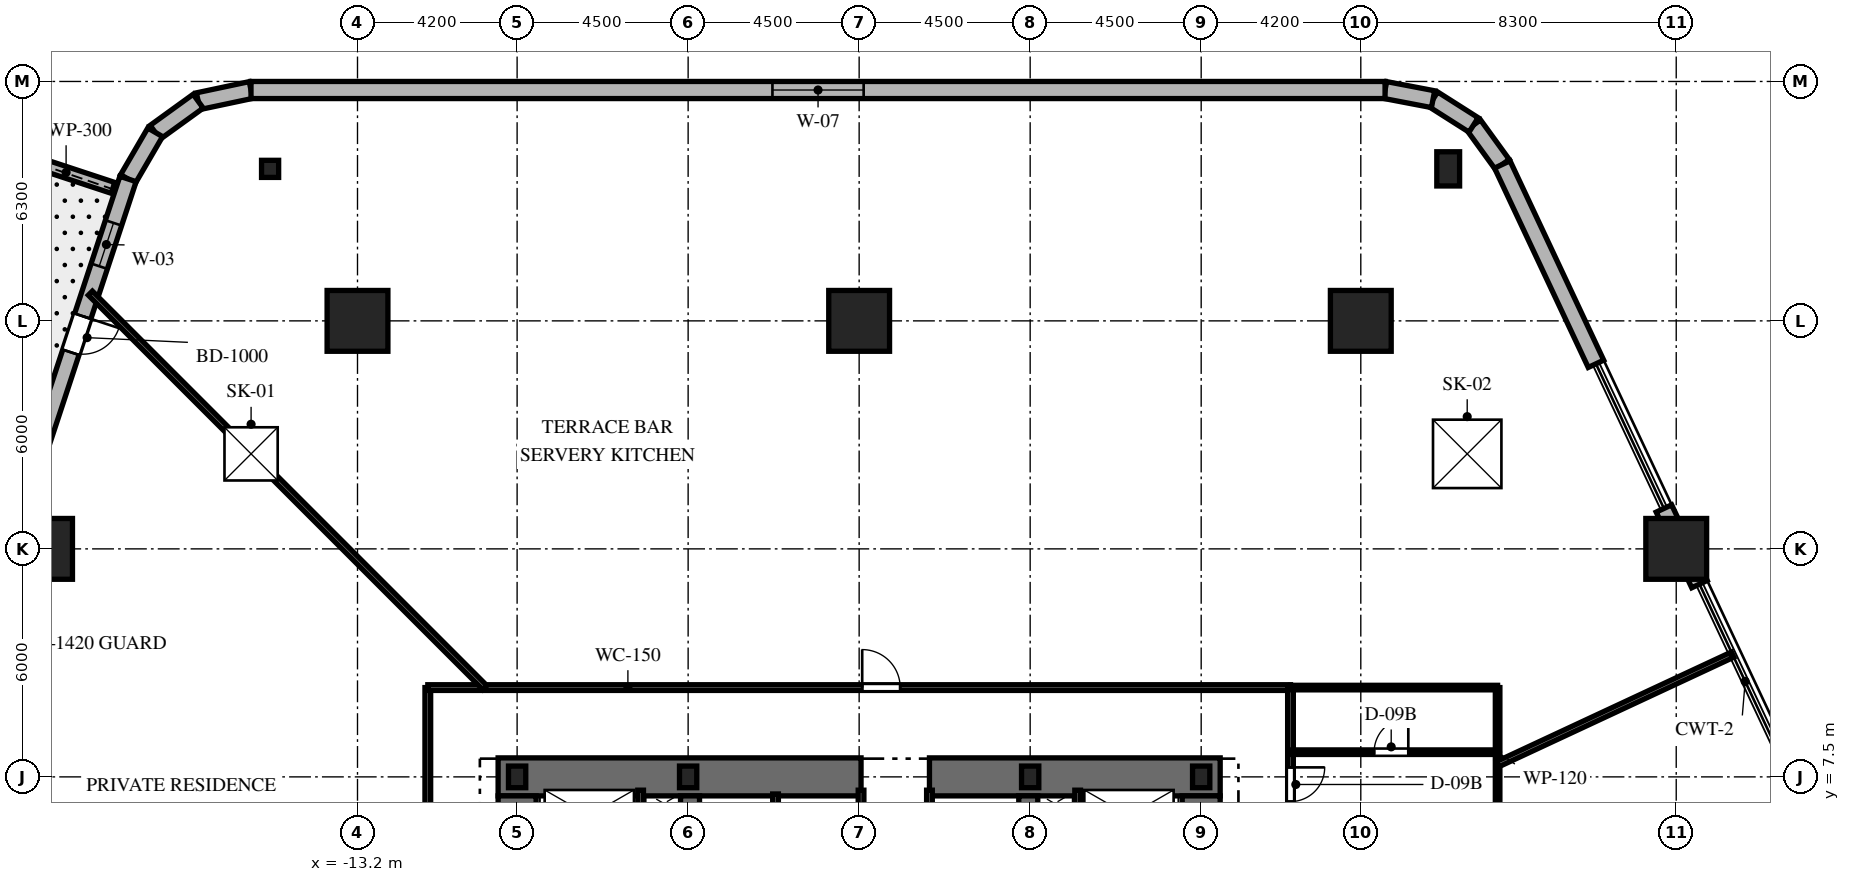
"""IFC4 building model, lengths in metres.
Left out: names, types, materials, properties, quantities, classifications, styles, units other than length and angle.
Written with IfcOpenShell. Run it as: python <this file> out.ifc"""

import sys

from ifc_helpers import new_model, si_unit, direction, frame, frame_2d, origin, origin_2d, place, context, subcontext, project, spatial, rectangle, i_section, extrude, element, fill, save


model = new_model("IFC4")
c1 = context("Model", 3, precision=1e-05, world=origin(), true_north=direction((0.0, 1.0)))
c2 = subcontext(c1, "Body", "Model", "MODEL_VIEW")
j1 = project(units=[si_unit("LENGTHUNIT", "METRE"), si_unit("PLANEANGLEUNIT", "RADIAN")], contexts=[c1])
p1 = place(None, origin())
s1 = spatial("IfcSite", under=j1, at=p1, CompositionType="ELEMENT")
p2 = place(p1, origin())
s2 = spatial("IfcBuilding", under=s1, at=p2, CompositionType="ELEMENT")
p3 = place(p2, frame((0.0, 0.0, 28.2)))
s3 = spatial("IfcBuildingStorey", under=s2, at=p3, CompositionType="ELEMENT", Elevation=28.2)
p4 = place(p3, frame((-9.5, 7.5, 0.0), z_axis=(0.0, 0.0, 1.0), x_axis=(1.0, 0.0, 0.0)))
e1 = element("IfcWall", 1, at=p4, inside=s3, PredefinedType="SHEAR", context=c2, shape_type="SweptSolid", body=[
    extrude(rectangle(XDim=9.55, YDim=1.0, at=frame_2d((4.775, 0.0))), origin(), (0.0, 0.0, 1.0), 6.0),
])
p5 = place(p3, frame((1.85, 7.5, 0.0), z_axis=(0.0, 0.0, 1.0), x_axis=(1.0, 0.0, 0.0)))
e2 = element("IfcWall", 2, at=p5, inside=s3, PredefinedType="SHEAR", context=c2, shape_type="SweptSolid", body=[
    extrude(rectangle(XDim=7.65, YDim=1.0, at=frame_2d((3.825, 0.0))), origin(), (0.0, 0.0, 1.0), 6.0),
])
p6 = place(p3, frame((-9.0, -7.0, 0.0), z_axis=(0.0, 0.0, 1.0), x_axis=(0.0, 1.0, 0.0)))
e3 = element("IfcWall", 3, at=p6, inside=s3, PredefinedType="SHEAR", context=c2, shape_type="SweptSolid", body=[
    extrude(rectangle(XDim=14.0, YDim=1.0, at=frame_2d((7.0, 0.0))), origin(), (0.0, 0.0, 1.0), 6.0),
])
p7 = place(p6, frame((10.125, 0.0, 0.0)))
e4 = element("IfcOpeningElement", 4, at=p7, cuts=e3, PredefinedType="OPENING", context=c2, shape_type="SweptSolid", body=[
    extrude(rectangle(XDim=1.05, YDim=2.15, at=frame_2d((0.525, 1.075))), frame((0.0, 0.51, 0.0), z_axis=(0.0, -1.0, 0.0), x_axis=(1.0, 0.0, 0.0)), (0.0, 0.0, 1.0), 1.02),
])
p8 = place(p3, frame((9.0, -7.0, 0.0), z_axis=(0.0, 0.0, 1.0), x_axis=(0.0, 1.0, 0.0)))
e5 = element("IfcWall", 5, at=p8, inside=s3, PredefinedType="SHEAR", context=c2, shape_type="SweptSolid", body=[
    extrude(rectangle(XDim=14.0, YDim=1.0, at=frame_2d((7.0, 0.0))), origin(), (0.0, 0.0, 1.0), 6.0),
])
p9 = place(p8, frame((10.125, 0.0, 0.0)))
e6 = element("IfcOpeningElement", 6, at=p9, cuts=e5, PredefinedType="OPENING", context=c2, shape_type="SweptSolid", body=[
    extrude(rectangle(XDim=1.05, YDim=2.15, at=frame_2d((0.525, 1.075))), frame((0.0, 0.51, 0.0), z_axis=(0.0, -1.0, 0.0), x_axis=(1.0, 0.0, 0.0)), (0.0, 0.0, 1.0), 1.02),
])
for number, where, z_axis, x_axis in (
    (7, (-4.45, 2.25, 0.0), (0.0, 0.0, 1.0), (0.0, 1.0, 0.0)),
    (8, (4.45, 2.25, 0.0), (0.0, 0.0, 1.0), (0.0, 1.0, 0.0)),
):
    element("IfcWall", number, at=place(p3, frame(where, z_axis=z_axis, x_axis=x_axis)), inside=s3, PredefinedType="SHEAR", context=c2, shape_type="SweptSolid", body=[
        extrude(rectangle(XDim=4.75, YDim=0.5, at=frame_2d((2.375, 0.0))), origin(), (0.0, 0.0, 1.0), 6.0),
    ])
for number, where, z_axis, x_axis in (
    (9, (9.0, 7.5, 0.0), (0.0, 0.0, 1.0), (1.0, 0.0, 0.0)),
    (10, (4.5, 7.5, 0.0), (0.0, 0.0, 1.0), (1.0, 0.0, 0.0)),
    (11, (-4.5, 7.5, 0.0), (0.0, 0.0, 1.0), (1.0, 0.0, 0.0)),
    (12, (-9.0, 7.5, 0.0), (0.0, 0.0, 1.0), (1.0, 0.0, 0.0)),
):
    element("IfcColumn", number, at=place(p3, frame(where, z_axis=z_axis, x_axis=x_axis)), inside=s3, PredefinedType="COLUMN", context=c2, shape_type="SweptSolid", body=[
        extrude(i_section(OverallWidth=0.454, OverallDepth=0.569, WebThickness=0.078, FlangeThickness=0.125, at=origin_2d()), origin(), (0.0, 0.0, 1.0), 6.0),
    ])
for number, where, z_axis, x_axis in (
    (13, (-21.5, 13.5, 0.0), (0.0, 0.0, 1.0), (1.0, 0.0, 0.0)),
    (14, (21.5, 13.5, 0.0), (0.0, 0.0, 1.0), (1.0, 0.0, 0.0)),
    (15, (-13.2, 19.5, 0.0), (0.0, 0.0, 1.0), (1.0, 0.0, 0.0)),
    (16, (0.0, 19.5, 0.0), (0.0, 0.0, 1.0), (1.0, 0.0, 0.0)),
    (17, (13.2, 19.5, 0.0), (0.0, 0.0, 1.0), (1.0, 0.0, 0.0)),
):
    element("IfcColumn", number, at=place(p3, frame(where, z_axis=z_axis, x_axis=x_axis)), inside=s3, PredefinedType="COLUMN", context=c2, shape_type="SweptSolid", body=[
        extrude(rectangle(XDim=1.6, YDim=1.6, at=origin_2d()), origin(), (0.0, 0.0, 1.0), 6.0),
    ])
p10 = place(p3, frame((15.5, 23.5, 0.0), z_axis=(0.0, 0.0, 1.0), x_axis=(1.0, 0.0, 0.0)))
e18 = element("IfcColumn", 18, at=p10, inside=s3, PredefinedType="PILASTER", context=c2, shape_type="SweptSolid", body=[
    extrude(rectangle(XDim=0.6, YDim=0.9, at=origin_2d()), origin(), (0.0, 0.0, 1.0), 6.0),
])
p11 = place(p3, frame((-15.5, 23.5, 0.0), z_axis=(0.0, 0.0, 1.0), x_axis=(1.0, 0.0, 0.0)))
e19 = element("IfcColumn", 19, at=p11, inside=s3, PredefinedType="PILASTER", context=c2, shape_type="SweptSolid", body=[
    extrude(rectangle(XDim=0.45, YDim=0.45, at=origin_2d()), origin(), (0.0, 0.0, 1.0), 6.0),
])
p12 = place(p3, frame((16.924, 23.616, 0.0), z_axis=(0.0, 0.0, 1.0), x_axis=(-0.587471507827, 0.809244850148, 0.0)))
e20 = element("IfcWall", 20, at=p12, inside=s3, PredefinedType="SOLIDWALL", context=c2, shape_type="SweptSolid", body=[
    extrude(rectangle(XDim=1.286, YDim=0.45, at=frame_2d((0.643, 0.0))), origin(), (0.0, 0.0, 1.0), 5.7),
])
p13 = place(p3, frame((16.168, 24.656, 0.0), z_axis=(0.0, 0.0, 1.0), x_axis=(-0.844090705307, 0.536200411426, 0.0)))
e21 = element("IfcWall", 21, at=p13, inside=s3, PredefinedType="SOLIDWALL", context=c2, shape_type="SweptSolid", body=[
    extrude(rectangle(XDim=1.264, YDim=0.45, at=frame_2d((0.632, 0.0))), origin(), (0.0, 0.0, 1.0), 5.7),
])
p14 = place(p3, frame((15.101, 25.334, 0.0), z_axis=(0.0, 0.0, 1.0), x_axis=(-0.982280348181, 0.18741749539, 0.0)))
e22 = element("IfcWall", 22, at=p14, inside=s3, PredefinedType="SOLIDWALL", context=c2, shape_type="SweptSolid", body=[
    extrude(rectangle(XDim=1.286, YDim=0.45, at=frame_2d((0.643, 0.0))), origin(), (0.0, 0.0, 1.0), 5.7),
])
p15 = place(p3, frame((-16.002, 25.575, 0.0), z_axis=(0.0, 0.0, 1.0), x_axis=(-0.978297489829, -0.207205263915, 0.0)))
e23 = element("IfcWall", 23, at=p15, inside=s3, PredefinedType="SOLIDWALL", context=c2, shape_type="SweptSolid", body=[
    extrude(rectangle(XDim=1.421, YDim=0.45, at=frame_2d((0.71, 0.0))), origin(), (0.0, 0.0, 1.0), 5.7),
])
p16 = place(p3, frame((-17.392, 25.281, 0.0), z_axis=(0.0, 0.0, 1.0), x_axis=(-0.810222644551, -0.586122228086, 0.0)))
e24 = element("IfcWall", 24, at=p16, inside=s3, PredefinedType="SOLIDWALL", context=c2, shape_type="SweptSolid", body=[
    extrude(rectangle(XDim=1.397, YDim=0.45, at=frame_2d((0.698, 0.0))), origin(), (0.0, 0.0, 1.0), 5.7),
])
p17 = place(p3, frame((-18.524, 24.462, 0.0), z_axis=(0.0, 0.0, 1.0), x_axis=(-0.503080278093, -0.864239685385, 0.0)))
e25 = element("IfcWall", 25, at=p17, inside=s3, PredefinedType="SOLIDWALL", context=c2, shape_type="SweptSolid", body=[
    extrude(rectangle(XDim=1.421, YDim=0.45, at=frame_2d((0.71, 0.0))), origin(), (0.0, 0.0, 1.0), 5.7),
])
p18 = place(p3, frame((22.112, 12.572, 0.0), z_axis=(0.0, 0.0, 1.0), x_axis=(-0.425192955888, 0.905102729122, 0.0)))
e26 = element("IfcWall", 26, at=p18, inside=s3, PredefinedType="SOLIDWALL", context=c2, shape_type="SweptSolid", body=[
    extrude(rectangle(XDim=2.2, YDim=0.45, at=frame_2d((1.1, 0.0))), origin(), (0.0, 0.0, 1.0), 5.7),
])
p19 = place(p3, frame((19.388, 18.37, 0.0), z_axis=(0.0, 0.0, 1.0), x_axis=(-0.425192418488, 0.905102981578, 0.0)))
e27 = element("IfcWall", 27, at=p19, inside=s3, PredefinedType="SOLIDWALL", context=c2, shape_type="SweptSolid", body=[
    extrude(rectangle(XDim=5.796, YDim=0.45, at=frame_2d((2.898, 0.0))), origin(), (0.0, 0.0, 1.0), 5.7),
])
p20 = place(p3, frame((13.838, 25.575, 0.0), z_axis=(0.0, 0.0, 1.0), x_axis=(-1.0, 0.0, 0.0)))
e28 = element("IfcWall", 28, at=p20, inside=s3, PredefinedType="SOLIDWALL", context=c2, shape_type="SweptSolid", body=[
    extrude(rectangle(XDim=29.841, YDim=0.45, at=frame_2d((14.92, 0.0))), origin(), (0.0, 0.0, 1.0), 5.7),
])
p21 = place(p20, frame((13.72, 0.0, 0.85)))
e29 = element("IfcOpeningElement", 29, at=p21, cuts=e28, PredefinedType="OPENING", context=c2, shape_type="SweptSolid", body=[
    extrude(rectangle(XDim=2.4, YDim=2.4, at=frame_2d((1.2, 1.2))), frame((0.0, 0.235, 0.0), z_axis=(0.0, -1.0, 0.0), x_axis=(1.0, 0.0, 0.0)), (0.0, 0.0, 1.0), 0.47),
])
p22 = place(p3, frame((-19.239, 23.234, 0.0), z_axis=(0.0, 0.0, 1.0), x_axis=(-0.312996463282, -0.949754291369, 0.0)))
e30 = element("IfcWall", 30, at=p22, inside=s3, PredefinedType="SOLIDWALL", context=c2, shape_type="SweptSolid", body=[
    extrude(rectangle(XDim=24.584, YDim=0.45, at=frame_2d((12.292, 0.0))), origin(), (0.0, 0.0, 1.0), 5.7),
])
p23 = place(p22, frame((3.802, 0.0, 0.0)))
e31 = element("IfcOpeningElement", 31, at=p23, cuts=e30, PredefinedType="OPENING", context=c2, shape_type="SweptSolid", body=[
    extrude(rectangle(XDim=1.0, YDim=2.15, at=frame_2d((0.5, 1.075))), frame((0.0, 0.235, 0.0), z_axis=(0.0, -1.0, 0.0), x_axis=(1.0, 0.0, 0.0)), (0.0, 0.0, 1.0), 0.47),
])
p24 = place(p22, frame((1.217, 0.0, 0.85)))
e32 = element("IfcOpeningElement", 32, at=p24, cuts=e30, PredefinedType="OPENING", context=c2, shape_type="SweptSolid", body=[
    extrude(rectangle(XDim=1.2, YDim=1.8, at=frame_2d((0.6, 0.9))), frame((0.0, 0.235, 0.0), z_axis=(0.0, -1.0, 0.0), x_axis=(1.0, 0.0, 0.0)), (0.0, 0.0, 1.0), 0.47),
])
p25 = place(p22, frame((12.464, 0.0, 0.85)))
e33 = element("IfcOpeningElement", 33, at=p25, cuts=e30, PredefinedType="OPENING", context=c2, shape_type="SweptSolid", body=[
    extrude(rectangle(XDim=2.4, YDim=2.4, at=frame_2d((1.2, 1.2))), frame((0.0, 0.235, 0.0), z_axis=(0.0, -1.0, 0.0), x_axis=(1.0, 0.0, 0.0)), (0.0, 0.0, 1.0), 0.47),
])
p26 = place(p3, frame((-19.633, 23.0, 0.0), z_axis=(0.0, 0.0, 1.0), x_axis=(-0.949766874343, 0.31295827901, 0.0)))
e34 = element("IfcWall", 34, at=p26, inside=s3, PredefinedType="PARAPET", context=c2, shape_type="SweptSolid", body=[
    extrude(rectangle(XDim=2.6, YDim=0.3, at=frame_2d((1.3, 0.0))), origin(), (0.0, 0.0, 1.0), 1.15),
])
for number, where, z_axis, x_axis in (
    (35, (-5.75, 5.74, 0.0), (0.0, 0.0, 1.0), (0.0, 1.0, 0.0)),
    (36, (5.75, 5.74, 0.0), (0.0, 0.0, 1.0), (0.0, 1.0, 0.0)),
):
    element("IfcWall", number, at=place(p3, frame(where, z_axis=z_axis, x_axis=x_axis)), inside=s3, PredefinedType="PARTITIONING", context=c2, shape_type="SweptSolid", body=[
        extrude(rectangle(XDim=1.41, YDim=0.15, at=frame_2d((0.705, 0.0))), origin(), (0.0, 0.0, 1.0), 5.7),
    ])
p27 = place(p3, frame((-2.2, 5.2, 0.0), z_axis=(0.0, 0.0, 1.0), x_axis=(0.0, 1.0, 0.0)))
e37 = element("IfcWall", 37, at=p27, inside=s3, PredefinedType="PARTITIONING", context=c2, shape_type="SweptSolid", body=[
    extrude(rectangle(XDim=1.85, YDim=0.15, at=frame_2d((0.925, 0.0))), origin(), (0.0, 0.0, 1.0), 5.7),
])
for number, where, z_axis, x_axis in (
    (38, (0.05, 5.2, 0.0), (0.0, 0.0, 1.0), (0.0, 1.0, 0.0)),
    (39, (1.85, 5.2, 0.0), (0.0, 0.0, 1.0), (0.0, 1.0, 0.0)),
):
    element("IfcWall", number, at=place(p3, frame(where, z_axis=z_axis, x_axis=x_axis)), inside=s3, PredefinedType="PARTITIONING", context=c2, shape_type="SweptSolid", body=[
        extrude(rectangle(XDim=1.95, YDim=0.15, at=frame_2d((0.975, 0.0))), origin(), (0.0, 0.0, 1.0), 5.7),
    ])
p28 = place(p3, frame((-11.35, -9.85, 0.0), z_axis=(0.0, 0.0, 1.0), x_axis=(0.0, 1.0, 0.0)))
e40 = element("IfcWall", 40, at=p28, inside=s3, PredefinedType="PARTITIONING", context=c2, shape_type="SweptSolid", body=[
    extrude(rectangle(XDim=19.7, YDim=0.15, at=frame_2d((9.85, 0.0))), origin(), (0.0, 0.0, 1.0), 3.89),
])
p29 = place(p28, frame((9.35, 0.0, 0.0)))
e41 = element("IfcOpeningElement", 41, at=p29, cuts=e40, PredefinedType="OPENING", context=c2, shape_type="SweptSolid", body=[
    extrude(rectangle(XDim=1.0, YDim=2.03, at=frame_2d((0.5, 1.015))), frame((0.0, 0.085, 0.0), z_axis=(0.0, -1.0, 0.0), x_axis=(1.0, 0.0, 0.0)), (0.0, 0.0, 1.0), 0.17),
])
p30 = place(p3, frame((-11.35, 9.85, 0.0), z_axis=(0.0, 0.0, 1.0), x_axis=(1.0, 0.0, 0.0)))
e42 = element("IfcWall", 42, at=p30, inside=s3, PredefinedType="PARTITIONING", context=c2, shape_type="SweptSolid", body=[
    extrude(rectangle(XDim=22.7, YDim=0.15, at=frame_2d((11.35, 0.0))), origin(), (0.0, 0.0, 1.0), 3.89),
])
p31 = place(p30, frame((11.43, 0.0, 0.0)))
e43 = element("IfcOpeningElement", 43, at=p31, cuts=e42, PredefinedType="OPENING", context=c2, shape_type="SweptSolid", body=[
    extrude(rectangle(XDim=1.0, YDim=2.03, at=frame_2d((0.5, 1.015))), frame((0.0, 0.085, 0.0), z_axis=(0.0, -1.0, 0.0), x_axis=(1.0, 0.0, 0.0)), (0.0, 0.0, 1.0), 0.17),
])
p32 = place(p3, frame((11.35, 9.85, 0.0), z_axis=(0.0, 0.0, 1.0), x_axis=(0.0, -1.0, 0.0)))
e44 = element("IfcWall", 44, at=p32, inside=s3, PredefinedType="PARTITIONING", context=c2, shape_type="SweptSolid", body=[
    extrude(rectangle(XDim=19.7, YDim=0.15, at=frame_2d((9.85, 0.0))), origin(), (0.0, 0.0, 1.0), 3.89),
])
p33 = place(p32, frame((2.1, 0.0, 0.0)))
e45 = element("IfcOpeningElement", 45, at=p33, cuts=e44, PredefinedType="OPENING", context=c2, shape_type="SweptSolid", body=[
    extrude(rectangle(XDim=0.9, YDim=2.03, at=frame_2d((0.45, 1.015))), frame((0.0, 0.085, 0.0), z_axis=(0.0, -1.0, 0.0), x_axis=(1.0, 0.0, 0.0)), (0.0, 0.0, 1.0), 0.17),
])
p34 = place(p32, frame((16.875, 0.0, 0.0)))
e46 = element("IfcOpeningElement", 46, at=p34, cuts=e44, PredefinedType="OPENING", context=c2, shape_type="SweptSolid", body=[
    extrude(rectangle(XDim=1.0, YDim=2.03, at=frame_2d((0.5, 1.015))), frame((0.0, 0.085, 0.0), z_axis=(0.0, -1.0, 0.0), x_axis=(1.0, 0.0, 0.0)), (0.0, 0.0, 1.0), 0.17),
])
p35 = place(p3, frame((16.8, 6.45, 0.0), z_axis=(0.0, 0.0, 1.0), x_axis=(0.0, 1.0, 0.0)))
e47 = element("IfcWall", 47, at=p35, inside=s3, PredefinedType="PARTITIONING", context=c2, shape_type="SweptSolid", body=[
    extrude(rectangle(XDim=3.4, YDim=0.12, at=frame_2d((1.7, 0.0))), origin(), (0.0, 0.0, 1.0), 3.89),
])
p36 = place(p3, frame((11.35, 9.85, 0.0), z_axis=(0.0, 0.0, 1.0), x_axis=(1.0, 0.0, 0.0)))
e48 = element("IfcWall", 48, at=p36, inside=s3, PredefinedType="PARTITIONING", context=c2, shape_type="SweptSolid", body=[
    extrude(rectangle(XDim=5.45, YDim=0.12, at=frame_2d((2.725, 0.0))), origin(), (0.0, 0.0, 1.0), 4.834),
])
p37 = place(p3, frame((11.35, 8.15, 0.0), z_axis=(0.0, 0.0, 1.0), x_axis=(1.0, 0.0, 0.0)))
e49 = element("IfcWall", 49, at=p37, inside=s3, PredefinedType="PARTITIONING", context=c2, shape_type="SweptSolid", body=[
    extrude(rectangle(XDim=5.45, YDim=0.12, at=frame_2d((2.725, 0.0))), origin(), (0.0, 0.0, 1.0), 5.7),
])
p38 = place(p37, frame((2.2, 0.0, 0.0)))
e50 = element("IfcOpeningElement", 50, at=p38, cuts=e49, PredefinedType="OPENING", context=c2, shape_type="SweptSolid", body=[
    extrude(rectangle(XDim=0.9, YDim=2.03, at=frame_2d((0.45, 1.015))), frame((0.0, 0.07, 0.0), z_axis=(0.0, -1.0, 0.0), x_axis=(1.0, 0.0, 0.0)), (0.0, 0.0, 1.0), 0.14),
])
p39 = place(p3, frame((16.8, 7.834, 0.0), z_axis=(0.0, 0.0, 1.0), x_axis=(0.906303781235, 0.422626852104, 0.0)))
e51 = element("IfcWall", 51, at=p39, inside=s3, PredefinedType="PARTITIONING", context=c2, shape_type="SweptSolid", body=[
    extrude(rectangle(XDim=6.822, YDim=0.15, at=frame_2d((3.411, 0.0))), origin(), (0.0, 0.0, 1.0), 2.89),
])
p40 = place(p3, frame((-9.85, 9.85, 0.0), z_axis=(0.0, 0.0, 1.0), x_axis=(-0.707106781187, 0.707106781187, 0.0)))
e52 = element("IfcWall", 52, at=p40, inside=s3, PredefinedType="PARTITIONING", context=c2, shape_type="SweptSolid", body=[
    extrude(rectangle(XDim=14.678, YDim=0.15, at=frame_2d((7.339, 0.0))), origin(), (0.0, 0.0, 1.0), 2.89),
])
p41 = place(p3, frame((0.0, 0.0, -0.32)))
p42 = place(p41, frame((-16.0, 16.0, 0.27)))
e53 = element("IfcWindow", 53, at=p42, inside=s3, PartitioningType="SINGLE_PANEL", PredefinedType="SKYLIGHT", context=c2, shape_type="SweptSolid", body=[
    extrude(rectangle(XDim=1.4, YDim=1.4, at=origin_2d()), origin(), (0.0, 0.0, 1.0), 0.05),
])
p43 = place(p41, frame((16.0, 16.0, 0.27)))
e54 = element("IfcWindow", 54, at=p43, inside=s3, PartitioningType="SINGLE_PANEL", PredefinedType="SKYLIGHT", context=c2, shape_type="SweptSolid", body=[
    extrude(rectangle(XDim=1.8, YDim=1.8, at=origin_2d()), origin(), (0.0, 0.0, 1.0), 0.05),
])
p44 = place(p21, origin())
e55 = element("IfcWindow", 55, at=p44, inside=s3, PartitioningType="SINGLE_PANEL", PredefinedType="WINDOW", context=c2, shape_type="SweptSolid", body=[
    extrude(rectangle(XDim=2.4, YDim=2.4, at=frame_2d((1.2, 1.2))), frame((0.0, 0.03, 0.0), z_axis=(0.0, -1.0, 0.0), x_axis=(1.0, 0.0, 0.0)), (0.0, 0.0, 1.0), 0.06),
])
fill(e29, e55)
p45 = place(p23, origin())
e56 = element("IfcDoor", 56, at=p45, inside=s3, OperationType="SINGLE_SWING_LEFT", PredefinedType="DOOR", context=c2, shape_type="SweptSolid", body=[
    extrude(rectangle(XDim=1.0, YDim=2.15, at=frame_2d((0.5, 1.075))), frame((0.0, 0.025, 0.0), z_axis=(0.0, -1.0, 0.0), x_axis=(1.0, 0.0, 0.0)), (0.0, 0.0, 1.0), 0.05),
])
fill(e31, e56)
p46 = place(p24, origin())
e57 = element("IfcWindow", 57, at=p46, inside=s3, PartitioningType="SINGLE_PANEL", PredefinedType="WINDOW", context=c2, shape_type="SweptSolid", body=[
    extrude(rectangle(XDim=1.2, YDim=1.8, at=frame_2d((0.6, 0.9))), frame((0.0, 0.03, 0.0), z_axis=(0.0, -1.0, 0.0), x_axis=(1.0, 0.0, 0.0)), (0.0, 0.0, 1.0), 0.06),
])
fill(e32, e57)
p47 = place(p33, origin())
e58 = element("IfcDoor", 58, at=p47, inside=s3, OperationType="SINGLE_SWING_LEFT", PredefinedType="DOOR", context=c2, shape_type="SweptSolid", body=[
    extrude(rectangle(XDim=0.9, YDim=2.03, at=frame_2d((0.45, 1.015))), frame((0.0, 0.025, 0.0), z_axis=(0.0, -1.0, 0.0), x_axis=(1.0, 0.0, 0.0)), (0.0, 0.0, 1.0), 0.05),
])
fill(e45, e58)
p48 = place(p38, origin())
e59 = element("IfcDoor", 59, at=p48, inside=s3, OperationType="SINGLE_SWING_RIGHT", PredefinedType="DOOR", context=c2, shape_type="SweptSolid", body=[
    extrude(rectangle(XDim=0.9, YDim=2.03, at=frame_2d((0.45, 1.015))), frame((0.0, 0.025, 0.0), z_axis=(0.0, -1.0, 0.0), x_axis=(1.0, 0.0, 0.0)), (0.0, 0.0, 1.0), 0.05),
])
fill(e50, e59)
p49 = place(p31, origin())
e60 = element("IfcDoor", 60, at=p49, inside=s3, OperationType="SINGLE_SWING_LEFT", PredefinedType="DOOR", context=c2, shape_type="SweptSolid", body=[
    extrude(rectangle(XDim=1.0, YDim=2.03, at=frame_2d((0.5, 1.015))), frame((0.0, 0.025, 0.0), z_axis=(0.0, -1.0, 0.0), x_axis=(1.0, 0.0, 0.0)), (0.0, 0.0, 1.0), 0.05),
])
fill(e43, e60)
save(model, sys.argv[1])
